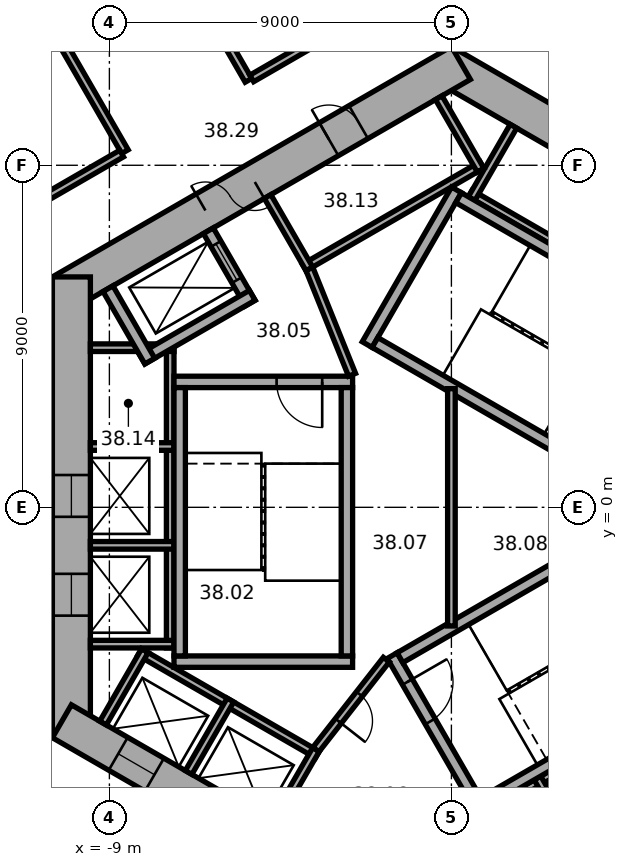
"""IFC4 building model, lengths in metres.
Left out: names, types, materials, properties, quantities, classifications, styles, units other than length and angle.
Written with IfcOpenShell. Run it as: python <this file> out.ifc"""

import sys

from ifc_helpers import new_model, si_unit, direction, frame, frame_2d, origin, place, context, subcontext, project, spatial, rectangle, extrude, element, fill, save


model = new_model("IFC4")
c1 = context("Model", 3, precision=1e-05, world=origin(), true_north=direction((0.0, 1.0)))
c2 = subcontext(c1, "Body", "Model", "MODEL_VIEW")
j1 = project(units=[si_unit("LENGTHUNIT", "METRE"), si_unit("PLANEANGLEUNIT", "RADIAN")], contexts=[c1])
p1 = place(None, origin())
s1 = spatial("IfcSite", under=j1, at=p1, CompositionType="ELEMENT")
p2 = place(p1, origin())
s2 = spatial("IfcBuilding", under=s1, at=p2, CompositionType="ELEMENT")
p3 = place(p2, frame((0.0, 0.0, 157.7)))
s3 = spatial("IfcBuildingStorey", under=s2, at=p3, CompositionType="ELEMENT", Elevation=157.7)
p4 = place(p3, frame((10.25, 5.629, 0.0), z_axis=(0.0, 0.0, 1.0), x_axis=(-0.866022616891, 0.50000482701, 0.0)))
e1 = element("IfcWall", 1, at=p4, inside=s3, PredefinedType="SHEAR", context=c2, shape_type="SweptSolid", body=[
    extrude(rectangle(XDim=12.125, YDim=1.0, at=frame_2d((6.062, 0.0))), origin(), (0.0, 0.0, 1.0), 3.7),
])
p5 = place(p4, frame((2.712, 0.0, 0.0)))
e2 = element("IfcOpeningElement", 2, at=p5, cuts=e1, PredefinedType="OPENING", context=c2, shape_type="SweptSolid", body=[
    extrude(rectangle(XDim=0.9, YDim=2.1, at=frame_2d((0.45, 1.05))), frame((0.0, 0.51, 0.0), z_axis=(0.0, -1.0, 0.0), x_axis=(1.0, 0.0, 0.0)), (0.0, 0.0, 1.0), 1.02),
])
p6 = place(p4, frame((6.612, 0.0, 0.0)))
e3 = element("IfcOpeningElement", 3, at=p6, cuts=e1, PredefinedType="OPENING", context=c2, shape_type="SweptSolid", body=[
    extrude(rectangle(XDim=0.9, YDim=2.1, at=frame_2d((0.45, 1.05))), frame((0.0, 0.51, 0.0), z_axis=(0.0, -1.0, 0.0), x_axis=(1.0, 0.0, 0.0)), (0.0, 0.0, 1.0), 1.02),
])
p7 = place(p3, frame((0.25, 11.691, 0.0), z_axis=(0.0, 0.0, 1.0), x_axis=(-0.866022616891, -0.50000482701, 0.0)))
e4 = element("IfcWall", 4, at=p7, inside=s3, PredefinedType="SHEAR", context=c2, shape_type="SweptSolid", body=[
    extrude(rectangle(XDim=12.125, YDim=1.0, at=frame_2d((6.062, 0.0))), origin(), (0.0, 0.0, 1.0), 3.7),
])
p8 = place(p7, frame((6.262, 0.0, 0.0)))
e5 = element("IfcOpeningElement", 5, at=p8, cuts=e4, PredefinedType="OPENING", context=c2, shape_type="SweptSolid", body=[
    extrude(rectangle(XDim=1.5, YDim=2.1, at=frame_2d((0.75, 1.05))), frame((0.0, 0.51, 0.0), z_axis=(0.0, -1.0, 0.0), x_axis=(1.0, 0.0, 0.0)), (0.0, 0.0, 1.0), 1.02),
])
p9 = place(p7, frame((3.112, 0.0, 0.0)))
e6 = element("IfcOpeningElement", 6, at=p9, cuts=e4, PredefinedType="OPENING", context=c2, shape_type="SweptSolid", body=[
    extrude(rectangle(XDim=0.9, YDim=2.1, at=frame_2d((0.45, 1.05))), frame((0.0, 0.51, 0.0), z_axis=(0.0, -1.0, 0.0), x_axis=(1.0, 0.0, 0.0)), (0.0, 0.0, 1.0), 1.02),
])
p10 = place(p3, frame((-10.0, 6.062, 0.0), z_axis=(0.0, 0.0, 1.0), x_axis=(0.0, -1.0, 0.0)))
e7 = element("IfcWall", 7, at=p10, inside=s3, PredefinedType="SHEAR", context=c2, shape_type="SweptSolid", body=[
    extrude(rectangle(XDim=12.125, YDim=1.0, at=frame_2d((6.062, 0.0))), origin(), (0.0, 0.0, 1.0), 3.7),
])
p11 = place(p10, frame((5.212, 0.0, 0.0)))
e8 = element("IfcOpeningElement", 8, at=p11, cuts=e7, PredefinedType="OPENING", context=c2, shape_type="SweptSolid", body=[
    extrude(rectangle(XDim=1.1, YDim=2.1, at=frame_2d((0.55, 1.05))), frame((0.0, 0.51, 0.0), z_axis=(0.0, -1.0, 0.0), x_axis=(1.0, 0.0, 0.0)), (0.0, 0.0, 1.0), 1.02),
])
p12 = place(p10, frame((7.812, 0.0, 0.0)))
e9 = element("IfcOpeningElement", 9, at=p12, cuts=e7, PredefinedType="OPENING", context=c2, shape_type="SweptSolid", body=[
    extrude(rectangle(XDim=1.1, YDim=2.1, at=frame_2d((0.55, 1.05))), frame((0.0, 0.51, 0.0), z_axis=(0.0, -1.0, 0.0), x_axis=(1.0, 0.0, 0.0)), (0.0, 0.0, 1.0), 1.02),
])
p13 = place(p3, frame((-10.25, -5.629, 0.0), z_axis=(0.0, 0.0, 1.0), x_axis=(0.866022616891, -0.50000482701, 0.0)))
e10 = element("IfcWall", 10, at=p13, inside=s3, PredefinedType="SHEAR", context=c2, shape_type="SweptSolid", body=[
    extrude(rectangle(XDim=12.125, YDim=1.0, at=frame_2d((6.062, 0.0))), origin(), (0.0, 0.0, 1.0), 3.7),
])
p14 = place(p13, frame((6.262, 0.0, 0.0)))
e11 = element("IfcOpeningElement", 11, at=p14, cuts=e10, PredefinedType="OPENING", context=c2, shape_type="SweptSolid", body=[
    extrude(rectangle(XDim=1.5, YDim=2.1, at=frame_2d((0.75, 1.05))), frame((0.0, 0.51, 0.0), z_axis=(0.0, -1.0, 0.0), x_axis=(1.0, 0.0, 0.0)), (0.0, 0.0, 1.0), 1.02),
])
p15 = place(p13, frame((1.712, 0.0, 0.0)))
e12 = element("IfcOpeningElement", 12, at=p15, cuts=e10, PredefinedType="OPENING", context=c2, shape_type="SweptSolid", body=[
    extrude(rectangle(XDim=1.1, YDim=2.1, at=frame_2d((0.55, 1.05))), frame((0.0, 0.51, 0.0), z_axis=(0.0, -1.0, 0.0), x_axis=(1.0, 0.0, 0.0)), (0.0, 0.0, 1.0), 1.02),
])
p16 = place(p13, frame((4.312, 0.0, 0.0)))
e13 = element("IfcOpeningElement", 13, at=p16, cuts=e10, PredefinedType="OPENING", context=c2, shape_type="SweptSolid", body=[
    extrude(rectangle(XDim=1.1, YDim=2.1, at=frame_2d((0.55, 1.05))), frame((0.0, 0.51, 0.0), z_axis=(0.0, -1.0, 0.0), x_axis=(1.0, 0.0, 0.0)), (0.0, 0.0, 1.0), 1.02),
])
p17 = place(p3, frame((-0.25, -11.691, 0.0), z_axis=(0.0, 0.0, 1.0), x_axis=(0.866022616891, 0.50000482701, 0.0)))
e14 = element("IfcWall", 14, at=p17, inside=s3, PredefinedType="SHEAR", context=c2, shape_type="SweptSolid", body=[
    extrude(rectangle(XDim=12.125, YDim=1.0, at=frame_2d((6.062, 0.0))), origin(), (0.0, 0.0, 1.0), 3.7),
])
p18 = place(p17, frame((2.612, 0.0, 0.0)))
e15 = element("IfcOpeningElement", 15, at=p18, cuts=e14, PredefinedType="OPENING", context=c2, shape_type="SweptSolid", body=[
    extrude(rectangle(XDim=1.1, YDim=2.1, at=frame_2d((0.55, 1.05))), frame((0.0, 0.51, 0.0), z_axis=(0.0, -1.0, 0.0), x_axis=(1.0, 0.0, 0.0)), (0.0, 0.0, 1.0), 1.02),
])
p19 = place(p17, frame((5.212, 0.0, 0.0)))
e16 = element("IfcOpeningElement", 16, at=p19, cuts=e14, PredefinedType="OPENING", context=c2, shape_type="SweptSolid", body=[
    extrude(rectangle(XDim=1.1, YDim=2.1, at=frame_2d((0.55, 1.05))), frame((0.0, 0.51, 0.0), z_axis=(0.0, -1.0, 0.0), x_axis=(1.0, 0.0, 0.0)), (0.0, 0.0, 1.0), 1.02),
])
p20 = place(p17, frame((7.812, 0.0, 0.0)))
e17 = element("IfcOpeningElement", 17, at=p20, cuts=e14, PredefinedType="OPENING", context=c2, shape_type="SweptSolid", body=[
    extrude(rectangle(XDim=1.1, YDim=2.1, at=frame_2d((0.55, 1.05))), frame((0.0, 0.51, 0.0), z_axis=(0.0, -1.0, 0.0), x_axis=(1.0, 0.0, 0.0)), (0.0, 0.0, 1.0), 1.02),
])
p21 = place(p3, frame((7.424, 4.259, 0.0), z_axis=(0.0, 0.0, 1.0), x_axis=(-0.866026010844, 0.49999894854, 0.0)))
e18 = element("IfcWall", 18, at=p21, inside=s3, PredefinedType="PARTITIONING", context=c2, shape_type="SweptSolid", body=[
    extrude(rectangle(XDim=8.0, YDim=0.2, at=frame_2d((4.0, 0.0))), origin(), (0.0, 0.0, 1.0), 3.42),
])
p22 = place(p3, frame((0.532, 8.122, 0.0), z_axis=(0.0, 0.0, 1.0), x_axis=(0.500077893725, 0.86598042715, 0.0)))
e19 = element("IfcWall", 19, at=p22, inside=s3, PredefinedType="PARTITIONING", context=c2, shape_type="SweptSolid", body=[
    extrude(rectangle(XDim=2.2, YDim=0.2, at=frame_2d((1.1, 0.0))), origin(), (0.0, 0.0, 1.0), 3.42),
])
p23 = place(p3, frame((0.803, 9.009, 0.0), z_axis=(0.0, 0.0, 1.0), x_axis=(-0.866028230842, -0.499995103361, 0.0)))
e20 = element("IfcWall", 20, at=p23, inside=s3, PredefinedType="PARTITIONING", context=c2, shape_type="SweptSolid", body=[
    extrude(rectangle(XDim=5.4, YDim=0.2, at=frame_2d((2.7, 0.0))), origin(), (0.0, 0.0, 1.0), 3.42),
])
p24 = place(p3, frame((0.767, 8.872, 0.0), z_axis=(0.0, 0.0, 1.0), x_axis=(-0.499994660107, 0.866028486751, 0.0)))
e21 = element("IfcWall", 21, at=p24, inside=s3, PredefinedType="PARTITIONING", context=c2, shape_type="SweptSolid", body=[
    extrude(rectangle(XDim=2.2, YDim=0.2, at=frame_2d((1.1, 0.0))), origin(), (0.0, 0.0, 1.0), 3.42),
])
p25 = place(p3, frame((-3.737, 6.272, 0.0), z_axis=(0.0, 0.0, 1.0), x_axis=(-0.50002983664, 0.866008176907, 0.0)))
e22 = element("IfcWall", 22, at=p25, inside=s3, PredefinedType="PARTITIONING", context=c2, shape_type="SweptSolid", body=[
    extrude(rectangle(XDim=2.2, YDim=0.2, at=frame_2d((1.1, 0.0))), origin(), (0.0, 0.0, 1.0), 3.42),
])
p26 = place(p3, frame((-7.4, 4.3, 0.0), z_axis=(0.0, 0.0, 1.0), x_axis=(0.0, -1.0, 0.0)))
e23 = element("IfcWall", 23, at=p26, inside=s3, PredefinedType="PARTITIONING", context=c2, shape_type="SweptSolid", body=[
    extrude(rectangle(XDim=8.0, YDim=0.2, at=frame_2d((4.0, 0.0))), origin(), (0.0, 0.0, 1.0), 3.42),
])
for number, where, z_axis, x_axis in (
    (24, (-7.3, 4.2, 0.0), (0.0, 0.0, 1.0), (-1.0, 0.0, 0.0)),
    (25, (-7.3, 1.6, 0.0), (0.0, 0.0, 1.0), (-1.0, 0.0, 0.0)),
    (26, (-7.3, -1.0, 0.0), (0.0, 0.0, 1.0), (-1.0, 0.0, 0.0)),
    (27, (-7.3, -3.6, 0.0), (0.0, 0.0, 1.0), (-1.0, 0.0, 0.0)),
):
    element("IfcWall", number, at=place(p3, frame(where, z_axis=z_axis, x_axis=x_axis)), inside=s3, PredefinedType="PARTITIONING", context=c2, shape_type="SweptSolid", body=[
        extrude(rectangle(XDim=2.2, YDim=0.2, at=frame_2d((1.1, 0.0))), origin(), (0.0, 0.0, 1.0), 3.42),
    ])
p27 = place(p3, frame((-8.203, -3.809, 0.0), z_axis=(0.0, 0.0, 1.0), x_axis=(0.866028230842, -0.499995103361, 0.0)))
e28 = element("IfcWall", 28, at=p27, inside=s3, PredefinedType="PARTITIONING", context=c2, shape_type="SweptSolid", body=[
    extrude(rectangle(XDim=5.4, YDim=0.2, at=frame_2d((2.7, 0.0))), origin(), (0.0, 0.0, 1.0), 3.42),
])
for number, where, z_axis, x_axis in (
    (29, (-8.067, -3.772, 0.0), (0.0, 0.0, 1.0), (-0.5, -0.866, 0.0)),
    (30, (-5.815, -5.072, 0.0), (0.0, 0.0, 1.0), (-0.5, -0.866, 0.0)),
):
    element("IfcWall", number, at=place(p3, frame(where, z_axis=z_axis, x_axis=x_axis)), inside=s3, PredefinedType="PARTITIONING", context=c2, shape_type="SweptSolid", body=[
        extrude(rectangle(XDim=2.2, YDim=0.2, at=frame_2d((1.1, 0.0))), origin(), (0.0, 0.0, 1.0), 3.42),
    ])
p28 = place(p3, frame((-3.563, -6.372, 0.0), z_axis=(0.0, 0.0, 1.0), x_axis=(-0.499994660107, -0.866028486751, 0.0)))
e31 = element("IfcWall", 31, at=p28, inside=s3, PredefinedType="PARTITIONING", context=c2, shape_type="SweptSolid", body=[
    extrude(rectangle(XDim=2.2, YDim=0.2, at=frame_2d((1.1, 0.0))), origin(), (0.0, 0.0, 1.0), 3.42),
])
p29 = place(p3, frame((-0.024, -8.559, 0.0), z_axis=(0.0, 0.0, 1.0), x_axis=(0.866026010844, 0.49999894854, 0.0)))
e32 = element("IfcWall", 32, at=p29, inside=s3, PredefinedType="PARTITIONING", context=c2, shape_type="SweptSolid", body=[
    extrude(rectangle(XDim=8.0, YDim=0.2, at=frame_2d((4.0, 0.0))), origin(), (0.0, 0.0, 1.0), 3.42),
])
p30 = place(p3, frame((2.264, -7.122, 0.0), z_axis=(0.0, 0.0, 1.0), x_axis=(0.500077893725, -0.86598042715, 0.0)))
e33 = element("IfcWall", 33, at=p30, inside=s3, PredefinedType="PARTITIONING", context=c2, shape_type="SweptSolid", body=[
    extrude(rectangle(XDim=2.2, YDim=0.2, at=frame_2d((1.1, 0.0))), origin(), (0.0, 0.0, 1.0), 3.42),
])
p31 = place(p3, frame((-2.216, 4.282, 0.0), z_axis=(0.0, 0.0, 1.0), x_axis=(0.499977259774, 0.866038532462, 0.0)))
e34 = element("IfcWall", 34, at=p31, inside=s3, PredefinedType="SHEAR", context=c2, shape_type="SweptSolid", body=[
    extrude(rectangle(XDim=4.7, YDim=0.3, at=frame_2d((2.35, 0.0))), origin(), (0.0, 0.0, 1.0), 3.42),
])
for number, where, z_axis, x_axis in (
    (35, (4.103, 0.807, 0.0), (0.0, 0.0, 1.0), (-0.866, 0.5, 0.0)),
    (36, (6.303, 4.617, 0.0), (0.0, 0.0, 1.0), (-0.866, 0.5, 0.0)),
):
    element("IfcWall", number, at=place(p3, frame(where, z_axis=z_axis, x_axis=x_axis)), inside=s3, PredefinedType="SHEAR", context=c2, shape_type="SweptSolid", body=[
        extrude(rectangle(XDim=7.06, YDim=0.3, at=frame_2d((3.53, 0.0))), origin(), (0.0, 0.0, 1.0), 3.42),
    ])
p32 = place(p3, frame((-2.6, 3.3, 0.0), z_axis=(0.0, 0.0, 1.0), x_axis=(-1.0, 0.0, 0.0)))
e37 = element("IfcWall", 37, at=p32, inside=s3, PredefinedType="SHEAR", context=c2, shape_type="SweptSolid", body=[
    extrude(rectangle(XDim=4.7, YDim=0.3, at=frame_2d((2.35, 0.0))), origin(), (0.0, 0.0, 1.0), 3.42),
])
p33 = place(p32, frame((0.8, 0.0, 0.0)))
e38 = element("IfcOpeningElement", 38, at=p33, cuts=e37, PredefinedType="OPENING", context=c2, shape_type="SweptSolid", body=[
    extrude(rectangle(XDim=1.2, YDim=2.1, at=frame_2d((0.6, 1.05))), frame((0.0, 0.16, 0.0), z_axis=(0.0, -1.0, 0.0), x_axis=(1.0, 0.0, 0.0)), (0.0, 0.0, 1.0), 0.32),
])
p34 = place(p3, frame((-2.6, -4.06, 0.0), z_axis=(0.0, 0.0, 1.0), x_axis=(-1.0, 0.0, 0.0)))
e39 = element("IfcWall", 39, at=p34, inside=s3, PredefinedType="SHEAR", context=c2, shape_type="SweptSolid", body=[
    extrude(rectangle(XDim=4.7, YDim=0.3, at=frame_2d((2.35, 0.0))), origin(), (0.0, 0.0, 1.0), 3.42),
])
for number, where, z_axis, x_axis in (
    (40, (-2.75, 3.15, 0.0), (0.0, 0.0, 1.0), (0.0, -1.0, 0.0)),
    (41, (-7.15, 3.15, 0.0), (0.0, 0.0, 1.0), (0.0, -1.0, 0.0)),
):
    element("IfcWall", number, at=place(p3, frame(where, z_axis=z_axis, x_axis=x_axis)), inside=s3, PredefinedType="SHEAR", context=c2, shape_type="SweptSolid", body=[
        extrude(rectangle(XDim=7.06, YDim=0.3, at=frame_2d((3.53, 0.0))), origin(), (0.0, 0.0, 1.0), 3.42),
    ])
p35 = place(p3, frame((-1.558, -3.902, 0.0), z_axis=(0.0, 0.0, 1.0), x_axis=(0.499977259774, -0.866038532462, 0.0)))
e42 = element("IfcWall", 42, at=p35, inside=s3, PredefinedType="SHEAR", context=c2, shape_type="SweptSolid", body=[
    extrude(rectangle(XDim=4.7, YDim=0.3, at=frame_2d((2.35, 0.0))), origin(), (0.0, 0.0, 1.0), 3.42),
])
p36 = place(p35, frame((0.8, 0.0, 0.0)))
e43 = element("IfcOpeningElement", 43, at=p36, cuts=e42, PredefinedType="OPENING", context=c2, shape_type="SweptSolid", body=[
    extrude(rectangle(XDim=1.2, YDim=2.1, at=frame_2d((0.6, 1.05))), frame((0.0, 0.16, 0.0), z_axis=(0.0, -1.0, 0.0), x_axis=(1.0, 0.0, 0.0)), (0.0, 0.0, 1.0), 0.32),
])
for number, where, z_axis, x_axis in (
    (44, (-1.353, -3.957, 0.0), (0.0, 0.0, 1.0), (0.866, 0.5, 0.0)),
    (45, (0.847, -7.767, 0.0), (0.0, 0.0, 1.0), (0.866, 0.5, 0.0)),
):
    element("IfcWall", number, at=place(p3, frame(where, z_axis=z_axis, x_axis=x_axis)), inside=s3, PredefinedType="SHEAR", context=c2, shape_type="SweptSolid", body=[
        extrude(rectangle(XDim=7.06, YDim=0.3, at=frame_2d((3.53, 0.0))), origin(), (0.0, 0.0, 1.0), 3.42),
    ])
p37 = place(p3, frame((-5.295, 5.372, 0.0), z_axis=(0.0, 0.0, 1.0), x_axis=(-0.500077893725, 0.86598042715, 0.0)))
e46 = element("IfcWall", 46, at=p37, inside=s3, PredefinedType="SHEAR", context=c2, shape_type="SweptSolid", body=[
    extrude(rectangle(XDim=2.2, YDim=0.3, at=frame_2d((1.1, 0.0))), origin(), (0.0, 0.0, 1.0), 3.42),
])
p38 = place(p37, frame((0.7, 0.0, 0.0)))
e47 = element("IfcOpeningElement", 47, at=p38, cuts=e46, PredefinedType="OPENING", context=c2, shape_type="SweptSolid", body=[
    extrude(rectangle(XDim=1.1, YDim=2.1, at=frame_2d((0.55, 1.05))), frame((0.0, 0.16, 0.0), z_axis=(0.0, -1.0, 0.0), x_axis=(1.0, 0.0, 0.0)), (0.0, 0.0, 1.0), 0.32),
])
p39 = place(p3, frame((-5.24, 5.577, 0.0), z_axis=(0.0, 0.0, 1.0), x_axis=(-0.866014461049, -0.500018952895, 0.0)))
e48 = element("IfcWall", 48, at=p39, inside=s3, PredefinedType="SHEAR", context=c2, shape_type="SweptSolid", body=[
    extrude(rectangle(XDim=3.35, YDim=0.3, at=frame_2d((1.675, 0.0))), origin(), (0.0, 0.0, 1.0), 3.42),
])
p40 = place(p3, frame((-7.937, 3.847, 0.0), z_axis=(0.0, 0.0, 1.0), x_axis=(-0.50002983664, 0.866008176907, 0.0)))
e49 = element("IfcWall", 49, at=p40, inside=s3, PredefinedType="SHEAR", context=c2, shape_type="SweptSolid", body=[
    extrude(rectangle(XDim=2.2, YDim=0.3, at=frame_2d((1.1, 0.0))), origin(), (0.0, 0.0, 1.0), 3.42),
])
p41 = place(p3, frame((-2.615, 3.487, 0.0), z_axis=(0.0, 0.0, 1.0), x_axis=(-0.373576831041, 0.92759924068, 0.0)))
e50 = element("IfcWall", 50, at=p41, inside=s3, PredefinedType="PARTITIONING", context=c2, shape_type="SweptSolid", body=[
    extrude(rectangle(XDim=3.002, YDim=0.2, at=frame_2d((1.501, 0.0))), origin(), (0.0, 0.0, 1.0), 3.42),
])
p42 = place(p3, frame((-1.712, -4.008, 0.0), z_axis=(0.0, 0.0, 1.0), x_axis=(-0.616549420702, -0.787316208287, 0.0)))
e51 = element("IfcWall", 51, at=p42, inside=s3, PredefinedType="PARTITIONING", context=c2, shape_type="SweptSolid", body=[
    extrude(rectangle(XDim=3.002, YDim=0.2, at=frame_2d((1.501, 0.0))), origin(), (0.0, 0.0, 1.0), 3.42),
])
p43 = place(p42, frame((1.15, 0.0, 0.0)))
e52 = element("IfcOpeningElement", 52, at=p43, cuts=e51, PredefinedType="OPENING", context=c2, shape_type="SweptSolid", body=[
    extrude(rectangle(XDim=0.9, YDim=2.1, at=frame_2d((0.45, 1.05))), frame((0.0, 0.11, 0.0), z_axis=(0.0, -1.0, 0.0), x_axis=(1.0, 0.0, 0.0)), (0.0, 0.0, 1.0), 0.22),
])
p44 = place(p3, frame((0.0, -3.122, 0.0), z_axis=(0.0, 0.0, 1.0), x_axis=(0.0, 1.0, 0.0)))
e53 = element("IfcWall", 53, at=p44, inside=s3, PredefinedType="PARTITIONING", context=c2, shape_type="SweptSolid", body=[
    extrude(rectangle(XDim=6.245, YDim=0.2, at=frame_2d((3.122, 0.0))), origin(), (0.0, 0.0, 1.0), 3.42),
])
p45 = place(p3, frame((-12.766, 16.589, 0.0), z_axis=(0.0, 0.0, 1.0), x_axis=(0.500010139422, -0.866019549707, 0.0)))
e54 = element("IfcWall", 54, at=p45, inside=s3, PredefinedType="PARTITIONING", context=c2, shape_type="SweptSolid", body=[
    extrude(rectangle(XDim=8.35, YDim=0.2, at=frame_2d((4.175, 0.0))), origin(), (0.0, 0.0, 1.0), 3.42),
])
p46 = place(p45, frame((3.675, 0.0, 0.0)))
e55 = element("IfcOpeningElement", 55, at=p46, cuts=e54, PredefinedType="OPENING", context=c2, shape_type="SweptSolid", body=[
    extrude(rectangle(XDim=1.0, YDim=2.1, at=frame_2d((0.5, 1.05))), frame((0.0, 0.11, 0.0), z_axis=(0.0, -1.0, 0.0), x_axis=(1.0, 0.0, 0.0)), (0.0, 0.0, 1.0), 0.22),
])
p47 = place(p3, frame((-9.515, 18.466, 0.0), z_axis=(0.0, 0.0, 1.0), x_axis=(0.500010139422, -0.866019549707, 0.0)))
e56 = element("IfcWall", 56, at=p47, inside=s3, PredefinedType="PARTITIONING", context=c2, shape_type="SweptSolid", body=[
    extrude(rectangle(XDim=8.35, YDim=0.2, at=frame_2d((4.175, 0.0))), origin(), (0.0, 0.0, 1.0), 2.87),
])
p48 = place(p47, frame((3.675, 0.0, 0.0)))
e57 = element("IfcOpeningElement", 57, at=p48, cuts=e56, PredefinedType="OPENING", context=c2, shape_type="SweptSolid", body=[
    extrude(rectangle(XDim=1.0, YDim=2.1, at=frame_2d((0.5, 1.05))), frame((0.0, 0.11, 0.0), z_axis=(0.0, -1.0, 0.0), x_axis=(1.0, 0.0, 0.0)), (0.0, 0.0, 1.0), 0.22),
])
p49 = place(p3, frame((-8.678, 9.308, 0.0), z_axis=(0.0, 0.0, 1.0), x_axis=(-0.866000359435, -0.500043375578, 0.0)))
e58 = element("IfcWall", 58, at=p49, inside=s3, PredefinedType="PARTITIONING", context=c2, shape_type="SweptSolid", body=[
    extrude(rectangle(XDim=3.161, YDim=0.2, at=frame_2d((1.581, 0.0))), origin(), (0.0, 0.0, 1.0), 3.42),
])
p50 = place(p3, frame((-0.95, 13.77, 0.0), z_axis=(0.0, 0.0, 1.0), x_axis=(-0.866036689987, -0.499980451214, 0.0)))
e59 = element("IfcWall", 59, at=p50, inside=s3, PredefinedType="PARTITIONING", context=c2, shape_type="SweptSolid", body=[
    extrude(rectangle(XDim=4.969, YDim=0.2, at=frame_2d((2.485, 0.0))), origin(), (0.0, 0.0, 1.0), 3.42),
])
p51 = place(p3, frame((9.224, 8.993, 0.0), z_axis=(0.0, 0.0, 1.0), x_axis=(-0.866031754707, 0.499988999718, 0.0)))
e60 = element("IfcWall", 60, at=p51, inside=s3, PredefinedType="PARTITIONING", context=c2, shape_type="SweptSolid", body=[
    extrude(rectangle(XDim=9.514, YDim=0.2, at=frame_2d((4.757, 0.0))), origin(), (0.0, 0.0, 1.0), 3.42),
])
p52 = place(p51, frame((3.848, 0.0, 0.0)))
e61 = element("IfcOpeningElement", 61, at=p52, cuts=e60, PredefinedType="OPENING", context=c2, shape_type="SweptSolid", body=[
    extrude(rectangle(XDim=1.0, YDim=2.1, at=frame_2d((0.5, 1.05))), frame((0.0, 0.11, 0.0), z_axis=(0.0, -1.0, 0.0), x_axis=(1.0, 0.0, 0.0)), (0.0, 0.0, 1.0), 0.22),
])
p53 = place(p8, origin())
e62 = element("IfcDoor", 62, at=p53, inside=s3, OperationType="DOUBLE_DOOR_SINGLE_SWING", PredefinedType="DOOR", context=c2, shape_type="SweptSolid", body=[
    extrude(rectangle(XDim=1.5, YDim=2.1, at=frame_2d((0.75, 1.05))), frame((0.0, 0.025, 0.0), z_axis=(0.0, -1.0, 0.0), x_axis=(1.0, 0.0, 0.0)), (0.0, 0.0, 1.0), 0.05),
])
fill(e5, e62)
p54 = place(p33, origin())
e63 = element("IfcDoor", 63, at=p54, inside=s3, OperationType="SINGLE_SWING_RIGHT", PredefinedType="DOOR", context=c2, shape_type="SweptSolid", body=[
    extrude(rectangle(XDim=1.2, YDim=2.1, at=frame_2d((0.6, 1.05))), frame((0.0, 0.025, 0.0), z_axis=(0.0, -1.0, 0.0), x_axis=(1.0, 0.0, 0.0)), (0.0, 0.0, 1.0), 0.05),
])
fill(e38, e63)
p55 = place(p36, origin())
e64 = element("IfcDoor", 64, at=p55, inside=s3, OperationType="SINGLE_SWING_RIGHT", PredefinedType="DOOR", context=c2, shape_type="SweptSolid", body=[
    extrude(rectangle(XDim=1.2, YDim=2.1, at=frame_2d((0.6, 1.05))), frame((0.0, 0.025, 0.0), z_axis=(0.0, -1.0, 0.0), x_axis=(1.0, 0.0, 0.0)), (0.0, 0.0, 1.0), 0.05),
])
fill(e43, e64)
p56 = place(p43, origin())
e65 = element("IfcDoor", 65, at=p56, inside=s3, OperationType="SINGLE_SWING_LEFT", PredefinedType="DOOR", context=c2, shape_type="SweptSolid", body=[
    extrude(rectangle(XDim=0.9, YDim=2.1, at=frame_2d((0.45, 1.05))), frame((0.0, 0.025, 0.0), z_axis=(0.0, -1.0, 0.0), x_axis=(1.0, 0.0, 0.0)), (0.0, 0.0, 1.0), 0.05),
])
fill(e52, e65)
p57 = place(p9, origin())
e66 = element("IfcDoor", 66, at=p57, inside=s3, OperationType="SINGLE_SWING_LEFT", PredefinedType="DOOR", context=c2, shape_type="SweptSolid", body=[
    extrude(rectangle(XDim=0.9, YDim=2.1, at=frame_2d((0.45, 1.05))), frame((0.0, 0.025, 0.0), z_axis=(0.0, -1.0, 0.0), x_axis=(1.0, 0.0, 0.0)), (0.0, 0.0, 1.0), 0.05),
])
fill(e6, e66)
p58 = place(p38, origin())
e67 = element("IfcDoor", 67, at=p58, inside=s3, OperationType="DOUBLE_DOOR_SLIDING", PredefinedType="DOOR", context=c2, shape_type="SweptSolid", body=[
    extrude(rectangle(XDim=1.1, YDim=2.1, at=frame_2d((0.55, 1.05))), frame((0.0, 0.025, 0.0), z_axis=(0.0, -1.0, 0.0), x_axis=(1.0, 0.0, 0.0)), (0.0, 0.0, 1.0), 0.05),
])
fill(e47, e67)
p59 = place(p11, origin())
e68 = element("IfcDoor", 68, at=p59, inside=s3, OperationType="DOUBLE_DOOR_SLIDING", PredefinedType="DOOR", context=c2, shape_type="SweptSolid", body=[
    extrude(rectangle(XDim=1.1, YDim=2.1, at=frame_2d((0.55, 1.05))), frame((0.0, 0.025, 0.0), z_axis=(0.0, -1.0, 0.0), x_axis=(1.0, 0.0, 0.0)), (0.0, 0.0, 1.0), 0.05),
])
fill(e8, e68)
p60 = place(p12, origin())
e69 = element("IfcDoor", 69, at=p60, inside=s3, OperationType="DOUBLE_DOOR_SLIDING", PredefinedType="DOOR", context=c2, shape_type="SweptSolid", body=[
    extrude(rectangle(XDim=1.1, YDim=2.1, at=frame_2d((0.55, 1.05))), frame((0.0, 0.025, 0.0), z_axis=(0.0, -1.0, 0.0), x_axis=(1.0, 0.0, 0.0)), (0.0, 0.0, 1.0), 0.05),
])
fill(e9, e69)
p61 = place(p15, origin())
e70 = element("IfcDoor", 70, at=p61, inside=s3, OperationType="DOUBLE_DOOR_SLIDING", PredefinedType="DOOR", context=c2, shape_type="SweptSolid", body=[
    extrude(rectangle(XDim=1.1, YDim=2.1, at=frame_2d((0.55, 1.05))), frame((0.0, 0.025, 0.0), z_axis=(0.0, -1.0, 0.0), x_axis=(1.0, 0.0, 0.0)), (0.0, 0.0, 1.0), 0.05),
])
fill(e12, e70)
save(model, sys.argv[1])
